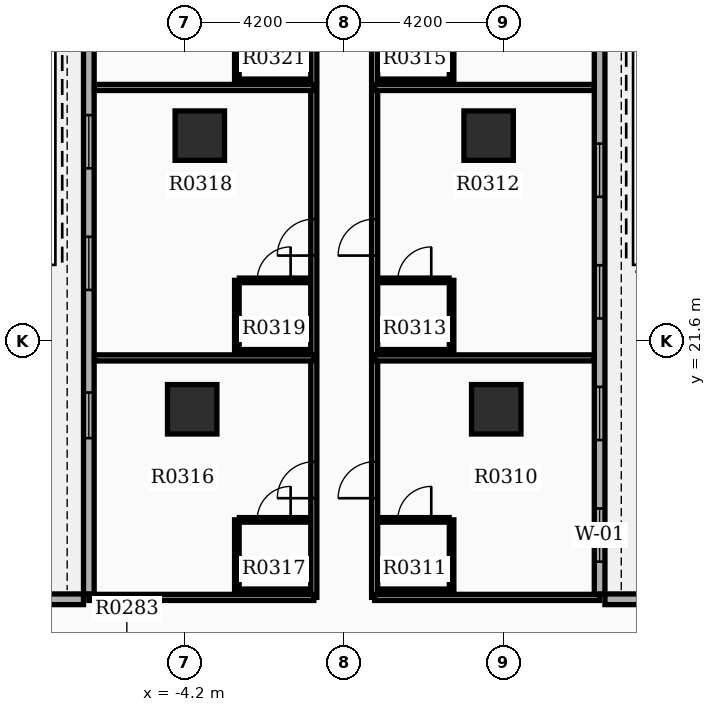
"""IFC4 building model, lengths in metres.
Left out: names, types, materials, properties, quantities, classifications, styles, units other than length and angle.
Written with IfcOpenShell. Run it as: python <this file> out.ifc"""

import sys

from ifc_helpers import new_model, si_unit, direction, frame, frame_2d, origin, origin_2d, place, context, subcontext, project, spatial, rectangle, extrude, element, fill, save


model = new_model("IFC4")
c1 = context("Model", 3, precision=1e-05, world=origin(), true_north=direction((0.0, 1.0)))
c2 = subcontext(c1, "Body", "Model", "MODEL_VIEW")
j1 = project(units=[si_unit("LENGTHUNIT", "METRE"), si_unit("PLANEANGLEUNIT", "RADIAN")], contexts=[c1])
p1 = place(None, origin())
s1 = spatial("IfcSite", under=j1, at=p1, CompositionType="ELEMENT")
p2 = place(p1, origin())
s2 = spatial("IfcBuilding", under=s1, at=p2, CompositionType="ELEMENT")
p3 = place(p2, frame((0.0, 0.0, 23.7)))
s3 = spatial("IfcBuildingStorey", under=s2, at=p3, CompositionType="ELEMENT", Elevation=23.7)
for number, where, z_axis, x_axis in (
    (1, (-4.0, 19.8, 0.0), (0.0, 0.0, 1.0), (1.0, 0.0, 0.0)),
    (2, (4.0, 19.8, 0.0), (0.0, 0.0, 1.0), (1.0, 0.0, 0.0)),
    (3, (-3.8, 27.0, 0.0), (0.0, 0.0, 1.0), (1.0, 0.0, 0.0)),
    (4, (3.8, 27.0, 0.0), (0.0, 0.0, 1.0), (1.0, 0.0, 0.0)),
):
    element("IfcColumn", number, at=place(p3, frame(where, z_axis=z_axis, x_axis=x_axis)), inside=s3, PredefinedType="COLUMN", context=c2, shape_type="SweptSolid", body=[
        extrude(rectangle(XDim=1.3, YDim=1.3, at=origin_2d()), origin(), (0.0, 0.0, 1.0), 3.9),
    ])
p4 = place(p3, frame((6.72, 14.94, 0.0), z_axis=(0.0, 0.0, 1.0), x_axis=(0.0, 1.0, 0.0)))
e5 = element("IfcWall", 5, at=p4, inside=s3, PredefinedType="STANDARD", context=c2, shape_type="SweptSolid", body=[
    extrude(rectangle(XDim=20.1, YDim=0.28, at=frame_2d((10.05, 0.0))), origin(), (0.0, 0.0, 1.0), 2.91),
])
p5 = place(p4, frame((0.85, 0.0, 0.8)))
e6 = element("IfcOpeningElement", 6, at=p5, cuts=e5, PredefinedType="OPENING", context=c2, shape_type="SweptSolid", body=[
    extrude(rectangle(XDim=1.4, YDim=1.6, at=frame_2d((0.7, 0.8))), frame((0.0, 0.15, 0.0), z_axis=(0.0, -1.0, 0.0), x_axis=(1.0, 0.0, 0.0)), (0.0, 0.0, 1.0), 0.3),
])
p6 = place(p4, frame((4.05, 0.0, 0.8)))
e7 = element("IfcOpeningElement", 7, at=p6, cuts=e5, PredefinedType="OPENING", context=c2, shape_type="SweptSolid", body=[
    extrude(rectangle(XDim=1.4, YDim=1.6, at=frame_2d((0.7, 0.8))), frame((0.0, 0.15, 0.0), z_axis=(0.0, -1.0, 0.0), x_axis=(1.0, 0.0, 0.0)), (0.0, 0.0, 1.0), 0.3),
])
p7 = place(p4, frame((7.25, 0.0, 0.8)))
e8 = element("IfcOpeningElement", 8, at=p7, cuts=e5, PredefinedType="OPENING", context=c2, shape_type="SweptSolid", body=[
    extrude(rectangle(XDim=1.4, YDim=1.6, at=frame_2d((0.7, 0.8))), frame((0.0, 0.15, 0.0), z_axis=(0.0, -1.0, 0.0), x_axis=(1.0, 0.0, 0.0)), (0.0, 0.0, 1.0), 0.3),
])
p8 = place(p4, frame((10.45, 0.0, 0.8)))
e9 = element("IfcOpeningElement", 9, at=p8, cuts=e5, PredefinedType="OPENING", context=c2, shape_type="SweptSolid", body=[
    extrude(rectangle(XDim=1.4, YDim=1.6, at=frame_2d((0.7, 0.8))), frame((0.0, 0.15, 0.0), z_axis=(0.0, -1.0, 0.0), x_axis=(1.0, 0.0, 0.0)), (0.0, 0.0, 1.0), 0.3),
])
p9 = place(p3, frame((-6.72, 35.04, 0.0), z_axis=(0.0, 0.0, 1.0), x_axis=(0.0, -1.0, 0.0)))
e10 = element("IfcWall", 10, at=p9, inside=s3, PredefinedType="STANDARD", context=c2, shape_type="SweptSolid", body=[
    extrude(rectangle(XDim=20.1, YDim=0.28, at=frame_2d((10.05, 0.0))), origin(), (0.0, 0.0, 1.0), 2.91),
])
p10 = place(p9, frame((4.05, 0.0, 0.8)))
e11 = element("IfcOpeningElement", 11, at=p10, cuts=e10, PredefinedType="OPENING", context=c2, shape_type="SweptSolid", body=[
    extrude(rectangle(XDim=1.4, YDim=1.6, at=frame_2d((0.7, 0.8))), frame((0.0, 0.15, 0.0), z_axis=(0.0, -1.0, 0.0), x_axis=(1.0, 0.0, 0.0)), (0.0, 0.0, 1.0), 0.3),
])
p11 = place(p9, frame((7.5, 0.0, 0.8)))
e12 = element("IfcOpeningElement", 12, at=p11, cuts=e10, PredefinedType="OPENING", context=c2, shape_type="SweptSolid", body=[
    extrude(rectangle(XDim=1.4, YDim=1.6, at=frame_2d((0.7, 0.8))), frame((0.0, 0.15, 0.0), z_axis=(0.0, -1.0, 0.0), x_axis=(1.0, 0.0, 0.0)), (0.0, 0.0, 1.0), 0.3),
])
p12 = place(p9, frame((10.7, 0.0, 0.8)))
e13 = element("IfcOpeningElement", 13, at=p12, cuts=e10, PredefinedType="OPENING", context=c2, shape_type="SweptSolid", body=[
    extrude(rectangle(XDim=1.4, YDim=1.6, at=frame_2d((0.7, 0.8))), frame((0.0, 0.15, 0.0), z_axis=(0.0, -1.0, 0.0), x_axis=(1.0, 0.0, 0.0)), (0.0, 0.0, 1.0), 0.3),
])
p13 = place(p9, frame((0.3, 0.0, 0.0)))
e14 = element("IfcOpeningElement", 14, at=p13, cuts=e10, PredefinedType="OPENING", context=c2, shape_type="SweptSolid", body=[
    extrude(rectangle(XDim=0.96, YDim=2.1, at=frame_2d((0.48, 1.05))), frame((0.0, 0.15, 0.0), z_axis=(0.0, -1.0, 0.0), x_axis=(1.0, 0.0, 0.0)), (0.0, 0.0, 1.0), 0.3),
])
p14 = place(p9, frame((14.799, 0.0, 0.85)))
e15 = element("IfcOpeningElement", 15, at=p14, cuts=e10, PredefinedType="OPENING", context=c2, shape_type="SweptSolid", body=[
    extrude(rectangle(XDim=1.2, YDim=1.6, at=frame_2d((0.6, 0.8))), frame((0.0, 0.15, 0.0), z_axis=(0.0, -1.0, 0.0), x_axis=(1.0, 0.0, 0.0)), (0.0, 0.0, 1.0), 0.3),
])
for number, where, z_axis, x_axis in (
    (16, (13.16, 14.8, 0.0), (0.0, 0.0, 1.0), (-1.0, 0.0, 0.0)),
    (17, (-13.16, 14.8, 0.0), (0.0, 0.0, 1.0), (1.0, 0.0, 0.0)),
):
    element("IfcWall", number, at=place(p3, frame(where, z_axis=z_axis, x_axis=x_axis)), inside=s3, PredefinedType="STANDARD", context=c2, shape_type="SweptSolid", body=[
        extrude(rectangle(XDim=6.3, YDim=0.28, at=frame_2d((3.15, 0.0))), origin(), (0.0, 0.0, 1.0), 2.91),
    ])
p15 = place(p3, frame((0.8, 14.85, 0.0), z_axis=(0.0, 0.0, 1.0), x_axis=(0.0, 1.0, 0.0)))
e18 = element("IfcWall", 18, at=p15, inside=s3, PredefinedType="PARTITIONING", context=c2, shape_type="SweptSolid", body=[
    extrude(rectangle(XDim=20.182, YDim=0.16, at=frame_2d((10.091, 0.0))), origin(), (0.0, 0.0, 1.0), 2.9),
])
p16 = place(p15, frame((2.61, 0.0, 0.0)))
e19 = element("IfcOpeningElement", 19, at=p16, cuts=e18, PredefinedType="OPENING", context=c2, shape_type="SweptSolid", body=[
    extrude(rectangle(XDim=0.96, YDim=2.15, at=frame_2d((0.48, 1.075))), frame((0.0, 0.09, 0.0), z_axis=(0.0, -1.0, 0.0), x_axis=(1.0, 0.0, 0.0)), (0.0, 0.0, 1.0), 0.18),
])
p17 = place(p15, frame((8.994, 0.0, 0.0)))
e20 = element("IfcOpeningElement", 20, at=p17, cuts=e18, PredefinedType="OPENING", context=c2, shape_type="SweptSolid", body=[
    extrude(rectangle(XDim=0.96, YDim=2.15, at=frame_2d((0.48, 1.075))), frame((0.0, 0.09, 0.0), z_axis=(0.0, -1.0, 0.0), x_axis=(1.0, 0.0, 0.0)), (0.0, 0.0, 1.0), 0.18),
])
p18 = place(p15, frame((18.93, 0.0, 0.0)))
e21 = element("IfcOpeningElement", 21, at=p18, cuts=e18, PredefinedType="OPENING", context=c2, shape_type="SweptSolid", body=[
    extrude(rectangle(XDim=0.96, YDim=2.15, at=frame_2d((0.48, 1.075))), frame((0.0, 0.09, 0.0), z_axis=(0.0, -1.0, 0.0), x_axis=(1.0, 0.0, 0.0)), (0.0, 0.0, 1.0), 0.18),
])
p19 = place(p3, frame((0.8, 14.85, 0.0), z_axis=(0.0, 0.0, 1.0), x_axis=(1.0, 0.0, 0.0)))
e22 = element("IfcWall", 22, at=p19, inside=s3, PredefinedType="PARTITIONING", context=c2, shape_type="SweptSolid", body=[
    extrude(rectangle(XDim=5.92, YDim=0.16, at=frame_2d((2.96, 0.0))), origin(), (0.0, 0.0, 1.0), 2.9),
])
p20 = place(p3, frame((0.8, 21.152, 0.0), z_axis=(0.0, 0.0, 1.0), x_axis=(1.0, 0.0, 0.0)))
e23 = element("IfcWall", 23, at=p20, inside=s3, PredefinedType="PARTITIONING", context=c2, shape_type="SweptSolid", body=[
    extrude(rectangle(XDim=5.772, YDim=0.16, at=frame_2d((2.886, 0.0))), origin(), (0.0, 0.0, 1.0), 2.9),
])
p21 = place(p3, frame((0.94, 16.89, 0.0), z_axis=(0.0, 0.0, 1.0), x_axis=(1.0, 0.0, 0.0)))
e24 = element("IfcWall", 24, at=p21, inside=s3, PredefinedType="PARTITIONING", context=c2, shape_type="SweptSolid", body=[
    extrude(rectangle(XDim=1.82, YDim=0.12, at=frame_2d((0.91, 0.0))), origin(), (0.0, 0.0, 1.0), 2.9),
])
p22 = place(p21, frame((0.47, 0.0, 0.0)))
e25 = element("IfcOpeningElement", 25, at=p22, cuts=e24, PredefinedType="OPENING", context=c2, shape_type="SweptSolid", body=[
    extrude(rectangle(XDim=0.88, YDim=2.1, at=frame_2d((0.44, 1.05))), frame((0.0, 0.07, 0.0), z_axis=(0.0, -1.0, 0.0), x_axis=(1.0, 0.0, 0.0)), (0.0, 0.0, 1.0), 0.14),
])
p23 = place(p3, frame((0.94, 15.01, 0.0), z_axis=(0.0, 0.0, 1.0), x_axis=(1.0, 0.0, 0.0)))
e26 = element("IfcWall", 26, at=p23, inside=s3, PredefinedType="PARTITIONING", context=c2, shape_type="SweptSolid", body=[
    extrude(rectangle(XDim=1.82, YDim=0.12, at=frame_2d((0.91, 0.0))), origin(), (0.0, 0.0, 1.0), 2.9),
])
p24 = place(p3, frame((2.825, 15.01, 0.0), z_axis=(0.0, 0.0, 1.0), x_axis=(0.0, 1.0, 0.0)))
e27 = element("IfcWall", 27, at=p24, inside=s3, PredefinedType="PARTITIONING", context=c2, shape_type="SweptSolid", body=[
    extrude(rectangle(XDim=1.88, YDim=0.12, at=frame_2d((0.94, 0.0))), origin(), (0.0, 0.0, 1.0), 2.9),
])
p25 = place(p3, frame((0.8, 28.268, 0.0), z_axis=(0.0, 0.0, 1.0), x_axis=(1.0, 0.0, 0.0)))
e28 = element("IfcWall", 28, at=p25, inside=s3, PredefinedType="PARTITIONING", context=c2, shape_type="SweptSolid", body=[
    extrude(rectangle(XDim=5.772, YDim=0.16, at=frame_2d((2.886, 0.0))), origin(), (0.0, 0.0, 1.0), 2.9),
])
p26 = place(p3, frame((0.94, 23.192, 0.0), z_axis=(0.0, 0.0, 1.0), x_axis=(1.0, 0.0, 0.0)))
e29 = element("IfcWall", 29, at=p26, inside=s3, PredefinedType="PARTITIONING", context=c2, shape_type="SweptSolid", body=[
    extrude(rectangle(XDim=1.82, YDim=0.12, at=frame_2d((0.91, 0.0))), origin(), (0.0, 0.0, 1.0), 2.9),
])
p27 = place(p26, frame((0.47, 0.0, 0.0)))
e30 = element("IfcOpeningElement", 30, at=p27, cuts=e29, PredefinedType="OPENING", context=c2, shape_type="SweptSolid", body=[
    extrude(rectangle(XDim=0.88, YDim=2.1, at=frame_2d((0.44, 1.05))), frame((0.0, 0.07, 0.0), z_axis=(0.0, -1.0, 0.0), x_axis=(1.0, 0.0, 0.0)), (0.0, 0.0, 1.0), 0.14),
])
p28 = place(p3, frame((0.94, 21.312, 0.0), z_axis=(0.0, 0.0, 1.0), x_axis=(1.0, 0.0, 0.0)))
e31 = element("IfcWall", 31, at=p28, inside=s3, PredefinedType="PARTITIONING", context=c2, shape_type="SweptSolid", body=[
    extrude(rectangle(XDim=1.82, YDim=0.12, at=frame_2d((0.91, 0.0))), origin(), (0.0, 0.0, 1.0), 2.9),
])
p29 = place(p3, frame((2.825, 21.312, 0.0), z_axis=(0.0, 0.0, 1.0), x_axis=(0.0, 1.0, 0.0)))
e32 = element("IfcWall", 32, at=p29, inside=s3, PredefinedType="PARTITIONING", context=c2, shape_type="SweptSolid", body=[
    extrude(rectangle(XDim=1.88, YDim=0.12, at=frame_2d((0.94, 0.0))), origin(), (0.0, 0.0, 1.0), 2.9),
])
p30 = place(p3, frame((0.94, 28.428, 0.0), z_axis=(0.0, 0.0, 1.0), x_axis=(1.0, 0.0, 0.0)))
e33 = element("IfcWall", 33, at=p30, inside=s3, PredefinedType="PARTITIONING", context=c2, shape_type="SweptSolid", body=[
    extrude(rectangle(XDim=1.82, YDim=0.12, at=frame_2d((0.91, 0.0))), origin(), (0.0, 0.0, 1.0), 2.9),
])
p31 = place(p3, frame((2.825, 28.428, 0.0), z_axis=(0.0, 0.0, 1.0), x_axis=(0.0, 1.0, 0.0)))
e34 = element("IfcWall", 34, at=p31, inside=s3, PredefinedType="PARTITIONING", context=c2, shape_type="SweptSolid", body=[
    extrude(rectangle(XDim=1.88, YDim=0.12, at=frame_2d((0.94, 0.0))), origin(), (0.0, 0.0, 1.0), 2.9),
])
p32 = place(p3, frame((-0.8, 14.85, 0.0), z_axis=(0.0, 0.0, 1.0), x_axis=(0.0, 1.0, 0.0)))
e35 = element("IfcWall", 35, at=p32, inside=s3, PredefinedType="PARTITIONING", context=c2, shape_type="SweptSolid", body=[
    extrude(rectangle(XDim=20.182, YDim=0.16, at=frame_2d((10.091, 0.0))), origin(), (0.0, 0.0, 1.0), 2.9),
])
p33 = place(p32, frame((2.61, 0.0, 0.0)))
e36 = element("IfcOpeningElement", 36, at=p33, cuts=e35, PredefinedType="OPENING", context=c2, shape_type="SweptSolid", body=[
    extrude(rectangle(XDim=0.96, YDim=2.15, at=frame_2d((0.48, 1.075))), frame((0.0, 0.09, 0.0), z_axis=(0.0, -1.0, 0.0), x_axis=(1.0, 0.0, 0.0)), (0.0, 0.0, 1.0), 0.18),
])
p34 = place(p32, frame((8.994, 0.0, 0.0)))
e37 = element("IfcOpeningElement", 37, at=p34, cuts=e35, PredefinedType="OPENING", context=c2, shape_type="SweptSolid", body=[
    extrude(rectangle(XDim=0.96, YDim=2.15, at=frame_2d((0.48, 1.075))), frame((0.0, 0.09, 0.0), z_axis=(0.0, -1.0, 0.0), x_axis=(1.0, 0.0, 0.0)), (0.0, 0.0, 1.0), 0.18),
])
p35 = place(p32, frame((18.93, 0.0, 0.0)))
e38 = element("IfcOpeningElement", 38, at=p35, cuts=e35, PredefinedType="OPENING", context=c2, shape_type="SweptSolid", body=[
    extrude(rectangle(XDim=0.96, YDim=2.15, at=frame_2d((0.48, 1.075))), frame((0.0, 0.09, 0.0), z_axis=(0.0, -1.0, 0.0), x_axis=(1.0, 0.0, 0.0)), (0.0, 0.0, 1.0), 0.18),
])
p36 = place(p3, frame((-0.8, 14.85, 0.0), z_axis=(0.0, 0.0, 1.0), x_axis=(-1.0, 0.0, 0.0)))
e39 = element("IfcWall", 39, at=p36, inside=s3, PredefinedType="PARTITIONING", context=c2, shape_type="SweptSolid", body=[
    extrude(rectangle(XDim=5.92, YDim=0.16, at=frame_2d((2.96, 0.0))), origin(), (0.0, 0.0, 1.0), 2.9),
])
p37 = place(p3, frame((-0.8, 21.152, 0.0), z_axis=(0.0, 0.0, 1.0), x_axis=(-1.0, 0.0, 0.0)))
e40 = element("IfcWall", 40, at=p37, inside=s3, PredefinedType="PARTITIONING", context=c2, shape_type="SweptSolid", body=[
    extrude(rectangle(XDim=5.772, YDim=0.16, at=frame_2d((2.886, 0.0))), origin(), (0.0, 0.0, 1.0), 2.9),
])
p38 = place(p3, frame((-2.76, 16.89, 0.0), z_axis=(0.0, 0.0, 1.0), x_axis=(1.0, 0.0, 0.0)))
e41 = element("IfcWall", 41, at=p38, inside=s3, PredefinedType="PARTITIONING", context=c2, shape_type="SweptSolid", body=[
    extrude(rectangle(XDim=1.82, YDim=0.12, at=frame_2d((0.91, 0.0))), origin(), (0.0, 0.0, 1.0), 2.9),
])
p39 = place(p38, frame((0.47, 0.0, 0.0)))
e42 = element("IfcOpeningElement", 42, at=p39, cuts=e41, PredefinedType="OPENING", context=c2, shape_type="SweptSolid", body=[
    extrude(rectangle(XDim=0.88, YDim=2.1, at=frame_2d((0.44, 1.05))), frame((0.0, 0.07, 0.0), z_axis=(0.0, -1.0, 0.0), x_axis=(1.0, 0.0, 0.0)), (0.0, 0.0, 1.0), 0.14),
])
p40 = place(p3, frame((-2.76, 15.01, 0.0), z_axis=(0.0, 0.0, 1.0), x_axis=(1.0, 0.0, 0.0)))
e43 = element("IfcWall", 43, at=p40, inside=s3, PredefinedType="PARTITIONING", context=c2, shape_type="SweptSolid", body=[
    extrude(rectangle(XDim=1.82, YDim=0.12, at=frame_2d((0.91, 0.0))), origin(), (0.0, 0.0, 1.0), 2.9),
])
p41 = place(p3, frame((-2.825, 15.01, 0.0), z_axis=(0.0, 0.0, 1.0), x_axis=(0.0, 1.0, 0.0)))
e44 = element("IfcWall", 44, at=p41, inside=s3, PredefinedType="PARTITIONING", context=c2, shape_type="SweptSolid", body=[
    extrude(rectangle(XDim=1.88, YDim=0.12, at=frame_2d((0.94, 0.0))), origin(), (0.0, 0.0, 1.0), 2.9),
])
p42 = place(p3, frame((-0.8, 28.268, 0.0), z_axis=(0.0, 0.0, 1.0), x_axis=(-1.0, 0.0, 0.0)))
e45 = element("IfcWall", 45, at=p42, inside=s3, PredefinedType="PARTITIONING", context=c2, shape_type="SweptSolid", body=[
    extrude(rectangle(XDim=5.772, YDim=0.16, at=frame_2d((2.886, 0.0))), origin(), (0.0, 0.0, 1.0), 2.9),
])
p43 = place(p3, frame((-2.76, 23.192, 0.0), z_axis=(0.0, 0.0, 1.0), x_axis=(1.0, 0.0, 0.0)))
e46 = element("IfcWall", 46, at=p43, inside=s3, PredefinedType="PARTITIONING", context=c2, shape_type="SweptSolid", body=[
    extrude(rectangle(XDim=1.82, YDim=0.12, at=frame_2d((0.91, 0.0))), origin(), (0.0, 0.0, 1.0), 2.9),
])
p44 = place(p43, frame((0.47, 0.0, 0.0)))
e47 = element("IfcOpeningElement", 47, at=p44, cuts=e46, PredefinedType="OPENING", context=c2, shape_type="SweptSolid", body=[
    extrude(rectangle(XDim=0.88, YDim=2.1, at=frame_2d((0.44, 1.05))), frame((0.0, 0.07, 0.0), z_axis=(0.0, -1.0, 0.0), x_axis=(1.0, 0.0, 0.0)), (0.0, 0.0, 1.0), 0.14),
])
p45 = place(p3, frame((-2.76, 21.312, 0.0), z_axis=(0.0, 0.0, 1.0), x_axis=(1.0, 0.0, 0.0)))
e48 = element("IfcWall", 48, at=p45, inside=s3, PredefinedType="PARTITIONING", context=c2, shape_type="SweptSolid", body=[
    extrude(rectangle(XDim=1.82, YDim=0.12, at=frame_2d((0.91, 0.0))), origin(), (0.0, 0.0, 1.0), 2.9),
])
p46 = place(p3, frame((-2.825, 21.312, 0.0), z_axis=(0.0, 0.0, 1.0), x_axis=(0.0, 1.0, 0.0)))
e49 = element("IfcWall", 49, at=p46, inside=s3, PredefinedType="PARTITIONING", context=c2, shape_type="SweptSolid", body=[
    extrude(rectangle(XDim=1.88, YDim=0.12, at=frame_2d((0.94, 0.0))), origin(), (0.0, 0.0, 1.0), 2.9),
])
p47 = place(p3, frame((-2.76, 28.428, 0.0), z_axis=(0.0, 0.0, 1.0), x_axis=(1.0, 0.0, 0.0)))
e50 = element("IfcWall", 50, at=p47, inside=s3, PredefinedType="PARTITIONING", context=c2, shape_type="SweptSolid", body=[
    extrude(rectangle(XDim=1.82, YDim=0.12, at=frame_2d((0.91, 0.0))), origin(), (0.0, 0.0, 1.0), 2.9),
])
p48 = place(p3, frame((-2.825, 28.428, 0.0), z_axis=(0.0, 0.0, 1.0), x_axis=(0.0, 1.0, 0.0)))
e51 = element("IfcWall", 51, at=p48, inside=s3, PredefinedType="PARTITIONING", context=c2, shape_type="SweptSolid", body=[
    extrude(rectangle(XDim=1.88, YDim=0.12, at=frame_2d((0.94, 0.0))), origin(), (0.0, 0.0, 1.0), 2.9),
])
p49 = place(p5, origin())
e52 = element("IfcWindow", 52, at=p49, inside=s3, PartitioningType="SINGLE_PANEL", PredefinedType="WINDOW", context=c2, shape_type="SweptSolid", body=[
    extrude(rectangle(XDim=1.4, YDim=1.6, at=frame_2d((0.7, 0.8))), frame((0.0, 0.03, 0.0), z_axis=(0.0, -1.0, 0.0), x_axis=(1.0, 0.0, 0.0)), (0.0, 0.0, 1.0), 0.06),
])
fill(e6, e52)
p50 = place(p6, origin())
e53 = element("IfcWindow", 53, at=p50, inside=s3, PartitioningType="SINGLE_PANEL", PredefinedType="WINDOW", context=c2, shape_type="SweptSolid", body=[
    extrude(rectangle(XDim=1.4, YDim=1.6, at=frame_2d((0.7, 0.8))), frame((0.0, 0.03, 0.0), z_axis=(0.0, -1.0, 0.0), x_axis=(1.0, 0.0, 0.0)), (0.0, 0.0, 1.0), 0.06),
])
fill(e7, e53)
p51 = place(p7, origin())
e54 = element("IfcWindow", 54, at=p51, inside=s3, PartitioningType="SINGLE_PANEL", PredefinedType="WINDOW", context=c2, shape_type="SweptSolid", body=[
    extrude(rectangle(XDim=1.4, YDim=1.6, at=frame_2d((0.7, 0.8))), frame((0.0, 0.03, 0.0), z_axis=(0.0, -1.0, 0.0), x_axis=(1.0, 0.0, 0.0)), (0.0, 0.0, 1.0), 0.06),
])
fill(e8, e54)
p52 = place(p8, origin())
e55 = element("IfcWindow", 55, at=p52, inside=s3, PartitioningType="SINGLE_PANEL", PredefinedType="WINDOW", context=c2, shape_type="SweptSolid", body=[
    extrude(rectangle(XDim=1.4, YDim=1.6, at=frame_2d((0.7, 0.8))), frame((0.0, 0.03, 0.0), z_axis=(0.0, -1.0, 0.0), x_axis=(1.0, 0.0, 0.0)), (0.0, 0.0, 1.0), 0.06),
])
fill(e9, e55)
p53 = place(p11, origin())
e56 = element("IfcWindow", 56, at=p53, inside=s3, PartitioningType="SINGLE_PANEL", PredefinedType="WINDOW", context=c2, shape_type="SweptSolid", body=[
    extrude(rectangle(XDim=1.4, YDim=1.6, at=frame_2d((0.7, 0.8))), frame((0.0, 0.03, 0.0), z_axis=(0.0, -1.0, 0.0), x_axis=(1.0, 0.0, 0.0)), (0.0, 0.0, 1.0), 0.06),
])
fill(e12, e56)
p54 = place(p12, origin())
e57 = element("IfcWindow", 57, at=p54, inside=s3, PartitioningType="SINGLE_PANEL", PredefinedType="WINDOW", context=c2, shape_type="SweptSolid", body=[
    extrude(rectangle(XDim=1.4, YDim=1.6, at=frame_2d((0.7, 0.8))), frame((0.0, 0.03, 0.0), z_axis=(0.0, -1.0, 0.0), x_axis=(1.0, 0.0, 0.0)), (0.0, 0.0, 1.0), 0.06),
])
fill(e13, e57)
p55 = place(p14, origin())
e58 = element("IfcWindow", 58, at=p55, inside=s3, PartitioningType="SINGLE_PANEL", PredefinedType="WINDOW", context=c2, shape_type="SweptSolid", body=[
    extrude(rectangle(XDim=1.2, YDim=1.6, at=frame_2d((0.6, 0.8))), frame((0.0, 0.03, 0.0), z_axis=(0.0, -1.0, 0.0), x_axis=(1.0, 0.0, 0.0)), (0.0, 0.0, 1.0), 0.06),
])
fill(e15, e58)
p56 = place(p16, origin())
e59 = element("IfcDoor", 59, at=p56, inside=s3, OperationType="SINGLE_SWING_LEFT", PredefinedType="DOOR", context=c2, shape_type="SweptSolid", body=[
    extrude(rectangle(XDim=0.96, YDim=2.15, at=frame_2d((0.48, 1.075))), frame((0.0, 0.025, 0.0), z_axis=(0.0, -1.0, 0.0), x_axis=(1.0, 0.0, 0.0)), (0.0, 0.0, 1.0), 0.05),
])
fill(e19, e59)
p57 = place(p22, origin())
e60 = element("IfcDoor", 60, at=p57, inside=s3, OperationType="SINGLE_SWING_RIGHT", PredefinedType="DOOR", context=c2, shape_type="SweptSolid", body=[
    extrude(rectangle(XDim=0.88, YDim=2.1, at=frame_2d((0.44, 1.05))), frame((0.0, 0.025, 0.0), z_axis=(0.0, -1.0, 0.0), x_axis=(1.0, 0.0, 0.0)), (0.0, 0.0, 1.0), 0.05),
])
fill(e25, e60)
p58 = place(p17, origin())
e61 = element("IfcDoor", 61, at=p58, inside=s3, OperationType="SINGLE_SWING_LEFT", PredefinedType="DOOR", context=c2, shape_type="SweptSolid", body=[
    extrude(rectangle(XDim=0.96, YDim=2.15, at=frame_2d((0.48, 1.075))), frame((0.0, 0.025, 0.0), z_axis=(0.0, -1.0, 0.0), x_axis=(1.0, 0.0, 0.0)), (0.0, 0.0, 1.0), 0.05),
])
fill(e20, e61)
p59 = place(p27, origin())
e62 = element("IfcDoor", 62, at=p59, inside=s3, OperationType="SINGLE_SWING_RIGHT", PredefinedType="DOOR", context=c2, shape_type="SweptSolid", body=[
    extrude(rectangle(XDim=0.88, YDim=2.1, at=frame_2d((0.44, 1.05))), frame((0.0, 0.025, 0.0), z_axis=(0.0, -1.0, 0.0), x_axis=(1.0, 0.0, 0.0)), (0.0, 0.0, 1.0), 0.05),
])
fill(e30, e62)
p60 = place(p33, origin())
e63 = element("IfcDoor", 63, at=p60, inside=s3, OperationType="SINGLE_SWING_LEFT", PredefinedType="DOOR", context=c2, shape_type="SweptSolid", body=[
    extrude(rectangle(XDim=0.96, YDim=2.15, at=frame_2d((0.48, 1.075))), frame((0.0, 0.025, 0.0), z_axis=(0.0, -1.0, 0.0), x_axis=(1.0, 0.0, 0.0)), (0.0, 0.0, 1.0), 0.05),
])
fill(e36, e63)
p61 = place(p39, origin())
e64 = element("IfcDoor", 64, at=p61, inside=s3, OperationType="SINGLE_SWING_RIGHT", PredefinedType="DOOR", context=c2, shape_type="SweptSolid", body=[
    extrude(rectangle(XDim=0.88, YDim=2.1, at=frame_2d((0.44, 1.05))), frame((0.0, 0.025, 0.0), z_axis=(0.0, -1.0, 0.0), x_axis=(1.0, 0.0, 0.0)), (0.0, 0.0, 1.0), 0.05),
])
fill(e42, e64)
p62 = place(p34, origin())
e65 = element("IfcDoor", 65, at=p62, inside=s3, OperationType="SINGLE_SWING_LEFT", PredefinedType="DOOR", context=c2, shape_type="SweptSolid", body=[
    extrude(rectangle(XDim=0.96, YDim=2.15, at=frame_2d((0.48, 1.075))), frame((0.0, 0.025, 0.0), z_axis=(0.0, -1.0, 0.0), x_axis=(1.0, 0.0, 0.0)), (0.0, 0.0, 1.0), 0.05),
])
fill(e37, e65)
p63 = place(p44, origin())
e66 = element("IfcDoor", 66, at=p63, inside=s3, OperationType="SINGLE_SWING_RIGHT", PredefinedType="DOOR", context=c2, shape_type="SweptSolid", body=[
    extrude(rectangle(XDim=0.88, YDim=2.1, at=frame_2d((0.44, 1.05))), frame((0.0, 0.025, 0.0), z_axis=(0.0, -1.0, 0.0), x_axis=(1.0, 0.0, 0.0)), (0.0, 0.0, 1.0), 0.05),
])
fill(e47, e66)
save(model, sys.argv[1])
